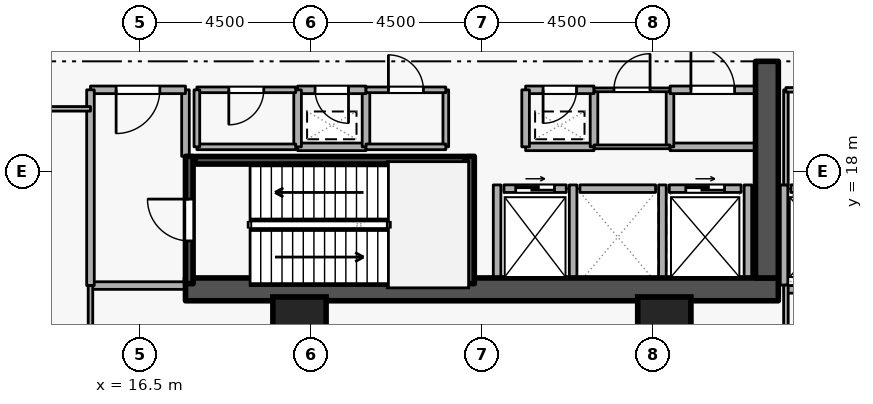
"""IFC4 building model, lengths in metres.
Left out: names, types, materials, properties, quantities, classifications, styles, units other than length and angle.
Written with IfcOpenShell. Run it as: python <this file> out.ifc"""

import sys

from ifc_helpers import new_model, si_unit, direction, frame, frame_2d, origin, origin_2d, place, context, subcontext, project, spatial, rectangle, extrude, element, fill, save


model = new_model("IFC4")
c1 = context("Model", 3, precision=1e-05, world=origin(), true_north=direction((0.0, 1.0)))
c2 = subcontext(c1, "Body", "Model", "MODEL_VIEW")
j1 = project(units=[si_unit("LENGTHUNIT", "METRE"), si_unit("PLANEANGLEUNIT", "RADIAN")], contexts=[c1])
p1 = place(None, origin())
s1 = spatial("IfcSite", under=j1, at=p1, CompositionType="ELEMENT")
p2 = place(p1, origin())
s2 = spatial("IfcBuilding", under=s1, at=p2, CompositionType="ELEMENT")
p3 = place(p2, frame((0.0, 0.0, 14.1)))
s3 = spatial("IfcBuildingStorey", under=s2, at=p3, CompositionType="ELEMENT", Elevation=14.1)
p4 = place(p3, frame((17.7, 14.9, 0.0), z_axis=(0.0, 0.0, 1.0), x_axis=(1.0, 0.0, 0.0)))
e1 = element("IfcWall", 1, at=p4, inside=s3, PredefinedType="SHEAR", context=c2, shape_type="SweptSolid", body=[
    extrude(rectangle(XDim=15.6, YDim=0.6, at=frame_2d((7.8, 0.0))), origin(), (0.0, 0.0, 1.0), 4.5),
])
p5 = place(p3, frame((33.0, 15.2, 0.0), z_axis=(0.0, 0.0, 1.0), x_axis=(0.0, 1.0, 0.0)))
e2 = element("IfcWall", 2, at=p5, inside=s3, PredefinedType="SHEAR", context=c2, shape_type="SweptSolid", body=[
    extrude(rectangle(XDim=5.7, YDim=0.6, at=frame_2d((2.85, 0.0))), origin(), (0.0, 0.0, 1.0), 4.5),
])
for number, where, z_axis, x_axis in (
    (3, (20.7, 14.0, 0.0), (0.0, 0.0, 1.0), (1.0, 0.0, 0.0)),
    (4, (30.3, 14.0, 0.0), (0.0, 0.0, 1.0), (1.0, 0.0, 0.0)),
):
    element("IfcColumn", number, at=place(p3, frame(where, z_axis=z_axis, x_axis=x_axis)), inside=s3, PredefinedType="COLUMN", context=c2, shape_type="SweptSolid", body=[
        extrude(rectangle(XDim=1.4, YDim=1.4, at=origin_2d()), origin(), (0.0, 0.0, 1.0), 4.5),
    ])
p6 = place(p3, frame((26.08, 17.55, 0.0), z_axis=(0.0, 0.0, 1.0), x_axis=(1.0, 0.0, 0.0)))
e5 = element("IfcWall", 5, at=p6, inside=s3, PredefinedType="STANDARD", context=c2, shape_type="SweptSolid", body=[
    extrude(rectangle(XDim=1.64, YDim=0.2, at=frame_2d((0.82, 0.0))), origin(), (0.0, 0.0, 1.0), 4.16),
])
p7 = place(p6, frame((0.31, 0.0, 0.0)))
e6 = element("IfcOpeningElement", 6, at=p7, cuts=e5, PredefinedType="OPENING", context=c2, shape_type="SweptSolid", body=[
    extrude(rectangle(XDim=1.02, YDim=2.06, at=frame_2d((0.51, 1.03))), frame((0.0, 0.11, 0.0), z_axis=(0.0, -1.0, 0.0), x_axis=(1.0, 0.0, 0.0)), (0.0, 0.0, 1.0), 0.22),
])
p8 = place(p3, frame((28.08, 17.55, 0.0), z_axis=(0.0, 0.0, 1.0), x_axis=(1.0, 0.0, 0.0)))
e7 = element("IfcWall", 7, at=p8, inside=s3, PredefinedType="STANDARD", context=c2, shape_type="SweptSolid", body=[
    extrude(rectangle(XDim=1.99, YDim=0.2, at=frame_2d((0.995, 0.0))), origin(), (0.0, 0.0, 1.0), 4.16),
])
p9 = place(p3, frame((30.43, 17.55, 0.0), z_axis=(0.0, 0.0, 1.0), x_axis=(1.0, 0.0, 0.0)))
e8 = element("IfcWall", 8, at=p9, inside=s3, PredefinedType="STANDARD", context=c2, shape_type="SweptSolid", body=[
    extrude(rectangle(XDim=1.89, YDim=0.2, at=frame_2d((0.945, 0.0))), origin(), (0.0, 0.0, 1.0), 4.16),
])
p10 = place(p9, frame((0.435, 0.0, 0.0)))
e9 = element("IfcOpeningElement", 9, at=p10, cuts=e8, PredefinedType="OPENING", context=c2, shape_type="SweptSolid", body=[
    extrude(rectangle(XDim=1.02, YDim=2.06, at=frame_2d((0.51, 1.03))), frame((0.0, 0.11, 0.0), z_axis=(0.0, -1.0, 0.0), x_axis=(1.0, 0.0, 0.0)), (0.0, 0.0, 1.0), 0.22),
])
p11 = place(p3, frame((33.63, 17.55, 0.0), z_axis=(0.0, 0.0, 1.0), x_axis=(1.0, 0.0, 0.0)))
e10 = element("IfcWall", 10, at=p11, inside=s3, PredefinedType="STANDARD", context=c2, shape_type="SweptSolid", body=[
    extrude(rectangle(XDim=1.74, YDim=0.2, at=frame_2d((0.87, 0.0))), origin(), (0.0, 0.0, 1.0), 4.16),
])
p12 = place(p11, frame((0.36, 0.0, 0.0)))
e11 = element("IfcOpeningElement", 11, at=p12, cuts=e10, PredefinedType="OPENING", context=c2, shape_type="SweptSolid", body=[
    extrude(rectangle(XDim=1.02, YDim=2.06, at=frame_2d((0.51, 1.03))), frame((0.0, 0.11, 0.0), z_axis=(0.0, -1.0, 0.0), x_axis=(1.0, 0.0, 0.0)), (0.0, 0.0, 1.0), 0.22),
])
for number, where, z_axis, x_axis in (
    (12, (27.9, 15.212, 0.0), (0.0, 0.0, 1.0), (0.0, 1.0, 0.0)),
    (13, (25.9, 15.212, 0.0), (0.0, 0.0, 1.0), (0.0, 1.0, 0.0)),
    (14, (30.25, 15.212, 0.0), (0.0, 0.0, 1.0), (0.0, 1.0, 0.0)),
    (15, (32.5, 15.212, 0.0), (0.0, 0.0, 1.0), (0.0, 1.0, 0.0)),
):
    element("IfcWall", number, at=place(p3, frame(where, z_axis=z_axis, x_axis=x_axis)), inside=s3, PredefinedType="STANDARD", context=c2, shape_type="SweptSolid", body=[
        extrude(rectangle(XDim=2.436, YDim=0.2, at=frame_2d((1.218, 0.0))), origin(), (0.0, 0.0, 1.0), 4.16),
    ])
p13 = place(p3, frame((33.452, 14.9, 0.0), z_axis=(0.0, 0.0, 1.0), x_axis=(1.0, 0.0, 0.0)))
e16 = element("IfcWall", 16, at=p13, inside=s3, PredefinedType="STANDARD", context=c2, shape_type="SweptSolid", body=[
    extrude(rectangle(XDim=4.196, YDim=0.2, at=frame_2d((2.098, 0.0))), origin(), (0.0, 0.0, 1.0), 4.16),
])
p14 = place(p3, frame((33.45, 15.012, 0.0), z_axis=(0.0, 0.0, 1.0), x_axis=(0.0, 1.0, 0.0)))
e17 = element("IfcWall", 17, at=p14, inside=s3, PredefinedType="STANDARD", context=c2, shape_type="SweptSolid", body=[
    extrude(rectangle(XDim=2.636, YDim=0.2, at=frame_2d((1.318, 0.0))), origin(), (0.0, 0.0, 1.0), 4.16),
])
p15 = place(p3, frame((17.8, 15.05, 0.0), z_axis=(0.0, 0.0, 1.0), x_axis=(0.0, 1.0, 0.0)))
e18 = element("IfcWall", 18, at=p15, inside=s3, PredefinedType="SHEAR", context=c2, shape_type="SweptSolid", body=[
    extrude(rectangle(XDim=3.35, YDim=0.2, at=frame_2d((1.675, 0.0))), origin(), (0.0, 0.0, 1.0), 4.5),
])
p16 = place(p15, frame((1.125, 0.0, 0.0)))
e19 = element("IfcOpeningElement", 19, at=p16, cuts=e18, PredefinedType="OPENING", context=c2, shape_type="SweptSolid", body=[
    extrude(rectangle(XDim=1.1, YDim=2.1, at=frame_2d((0.55, 1.05))), frame((0.0, 0.11, 0.0), z_axis=(0.0, -1.0, 0.0), x_axis=(1.0, 0.0, 0.0)), (0.0, 0.0, 1.0), 0.22),
])
p17 = place(p3, frame((25.2, 18.4, 0.0), z_axis=(0.0, 0.0, 1.0), x_axis=(0.0, -1.0, 0.0)))
e20 = element("IfcWall", 20, at=p17, inside=s3, PredefinedType="SHEAR", context=c2, shape_type="SweptSolid", body=[
    extrude(rectangle(XDim=3.35, YDim=0.2, at=frame_2d((1.675, 0.0))), origin(), (0.0, 0.0, 1.0), 4.5),
])
p18 = place(p3, frame((25.05, 18.297, 0.0), z_axis=(0.0, 0.0, 1.0), x_axis=(-1.0, 0.0, 0.0)))
e21 = element("IfcWall", 21, at=p18, inside=s3, PredefinedType="SHEAR", context=c2, shape_type="SweptSolid", body=[
    extrude(rectangle(XDim=7.1, YDim=0.2, at=frame_2d((3.55, 0.0))), origin(), (0.0, 0.0, 1.0), 4.5),
])
p19 = place(p3, frame((15.2, 15.0, 0.0), z_axis=(0.0, 0.0, 1.0), x_axis=(1.0, 0.0, 0.0)))
e22 = element("IfcWall", 22, at=p19, inside=s3, PredefinedType="STANDARD", context=c2, shape_type="SweptSolid", body=[
    extrude(rectangle(XDim=2.5, YDim=0.2, at=frame_2d((1.25, 0.0))), origin(), (0.0, 0.0, 1.0), 4.16),
])
p20 = place(p3, frame((17.7, 18.4, 0.0), z_axis=(0.0, 0.0, 1.0), x_axis=(0.0, 1.0, 0.0)))
e23 = element("IfcWall", 23, at=p20, inside=s3, PredefinedType="STANDARD", context=c2, shape_type="SweptSolid", body=[
    extrude(rectangle(XDim=1.75, YDim=0.2, at=frame_2d((0.875, 0.0))), origin(), (0.0, 0.0, 1.0), 3.365),
])
p21 = place(p3, frame((17.7, 20.15, 0.0), z_axis=(0.0, 0.0, 1.0), x_axis=(-1.0, 0.0, 0.0)))
e24 = element("IfcWall", 24, at=p21, inside=s3, PredefinedType="STANDARD", context=c2, shape_type="SweptSolid", body=[
    extrude(rectangle(XDim=2.5, YDim=0.2, at=frame_2d((1.25, 0.0))), origin(), (0.0, 0.0, 1.0), 4.16),
])
p22 = place(p21, frame((0.675, 0.0, 0.0)))
e25 = element("IfcOpeningElement", 25, at=p22, cuts=e24, PredefinedType="OPENING", context=c2, shape_type="SweptSolid", body=[
    extrude(rectangle(XDim=1.15, YDim=2.1, at=frame_2d((0.575, 1.05))), frame((0.0, 0.11, 0.0), z_axis=(0.0, -1.0, 0.0), x_axis=(1.0, 0.0, 0.0)), (0.0, 0.0, 1.0), 0.22),
])
p23 = place(p3, frame((15.2, 20.15, 0.0), z_axis=(0.0, 0.0, 1.0), x_axis=(0.0, -1.0, 0.0)))
e26 = element("IfcWall", 26, at=p23, inside=s3, PredefinedType="STANDARD", context=c2, shape_type="SweptSolid", body=[
    extrude(rectangle(XDim=5.15, YDim=0.2, at=frame_2d((2.575, 0.0))), origin(), (0.0, 0.0, 1.0), 4.16),
])
p24 = place(p3, frame((26.65, 18.65, 0.0), z_axis=(0.0, 0.0, 1.0), x_axis=(1.0, 0.0, 0.0)))
e27 = element("IfcWall", 27, at=p24, inside=s3, PredefinedType="STANDARD", context=c2, shape_type="SweptSolid", body=[
    extrude(rectangle(XDim=1.8, YDim=0.2, at=frame_2d((0.9, 0.0))), origin(), (0.0, 0.0, 1.0), 4.16),
])
p25 = place(p3, frame((28.45, 18.65, 0.0), z_axis=(0.0, 0.0, 1.0), x_axis=(0.0, 1.0, 0.0)))
e28 = element("IfcWall", 28, at=p25, inside=s3, PredefinedType="STANDARD", context=c2, shape_type="SweptSolid", body=[
    extrude(rectangle(XDim=1.5, YDim=0.2, at=frame_2d((0.75, 0.0))), origin(), (0.0, 0.0, 1.0), 4.16),
])
p26 = place(p3, frame((28.45, 20.15, 0.0), z_axis=(0.0, 0.0, 1.0), x_axis=(-1.0, 0.0, 0.0)))
e29 = element("IfcWall", 29, at=p26, inside=s3, PredefinedType="STANDARD", context=c2, shape_type="SweptSolid", body=[
    extrude(rectangle(XDim=1.8, YDim=0.2, at=frame_2d((0.9, 0.0))), origin(), (0.0, 0.0, 1.0), 4.16),
])
p27 = place(p26, frame((0.46, 0.0, 0.0)))
e30 = element("IfcOpeningElement", 30, at=p27, cuts=e29, PredefinedType="OPENING", context=c2, shape_type="SweptSolid", body=[
    extrude(rectangle(XDim=0.88, YDim=2.04, at=frame_2d((0.44, 1.02))), frame((0.0, 0.11, 0.0), z_axis=(0.0, -1.0, 0.0), x_axis=(1.0, 0.0, 0.0)), (0.0, 0.0, 1.0), 0.22),
])
p28 = place(p3, frame((26.65, 20.15, 0.0), z_axis=(0.0, 0.0, 1.0), x_axis=(0.0, -1.0, 0.0)))
e31 = element("IfcWall", 31, at=p28, inside=s3, PredefinedType="STANDARD", context=c2, shape_type="SweptSolid", body=[
    extrude(rectangle(XDim=1.5, YDim=0.2, at=frame_2d((0.75, 0.0))), origin(), (0.0, 0.0, 1.0), 4.16),
])
p29 = place(p3, frame((20.65, 18.65, 0.0), z_axis=(0.0, 0.0, 1.0), x_axis=(1.0, 0.0, 0.0)))
e32 = element("IfcWall", 32, at=p29, inside=s3, PredefinedType="STANDARD", context=c2, shape_type="SweptSolid", body=[
    extrude(rectangle(XDim=1.8, YDim=0.2, at=frame_2d((0.9, 0.0))), origin(), (0.0, 0.0, 1.0), 4.16),
])
p30 = place(p3, frame((22.45, 18.65, 0.0), z_axis=(0.0, 0.0, 1.0), x_axis=(0.0, 1.0, 0.0)))
e33 = element("IfcWall", 33, at=p30, inside=s3, PredefinedType="STANDARD", context=c2, shape_type="SweptSolid", body=[
    extrude(rectangle(XDim=1.5, YDim=0.2, at=frame_2d((0.75, 0.0))), origin(), (0.0, 0.0, 1.0), 4.16),
])
p31 = place(p3, frame((22.45, 20.15, 0.0), z_axis=(0.0, 0.0, 1.0), x_axis=(-1.0, 0.0, 0.0)))
e34 = element("IfcWall", 34, at=p31, inside=s3, PredefinedType="STANDARD", context=c2, shape_type="SweptSolid", body=[
    extrude(rectangle(XDim=1.8, YDim=0.2, at=frame_2d((0.9, 0.0))), origin(), (0.0, 0.0, 1.0), 4.16),
])
p32 = place(p31, frame((0.46, 0.0, 0.0)))
e35 = element("IfcOpeningElement", 35, at=p32, cuts=e34, PredefinedType="OPENING", context=c2, shape_type="SweptSolid", body=[
    extrude(rectangle(XDim=0.88, YDim=2.04, at=frame_2d((0.44, 1.02))), frame((0.0, 0.11, 0.0), z_axis=(0.0, -1.0, 0.0), x_axis=(1.0, 0.0, 0.0)), (0.0, 0.0, 1.0), 0.22),
])
p33 = place(p3, frame((20.65, 20.15, 0.0), z_axis=(0.0, 0.0, 1.0), x_axis=(0.0, -1.0, 0.0)))
e36 = element("IfcWall", 36, at=p33, inside=s3, PredefinedType="STANDARD", context=c2, shape_type="SweptSolid", body=[
    extrude(rectangle(XDim=1.5, YDim=0.2, at=frame_2d((0.75, 0.0))), origin(), (0.0, 0.0, 1.0), 4.16),
])
p34 = place(p3, frame((32.7, 18.65, 0.0), z_axis=(0.0, 0.0, 1.0), x_axis=(-1.0, 0.0, 0.0)))
e37 = element("IfcWall", 37, at=p34, inside=s3, PredefinedType="STANDARD", context=c2, shape_type="SweptSolid", body=[
    extrude(rectangle(XDim=2.25, YDim=0.2, at=frame_2d((1.125, 0.0))), origin(), (0.0, 0.0, 1.0), 4.16),
])
p35 = place(p3, frame((30.45, 18.65, 0.0), z_axis=(0.0, 0.0, 1.0), x_axis=(0.0, 1.0, 0.0)))
e38 = element("IfcWall", 38, at=p35, inside=s3, PredefinedType="STANDARD", context=c2, shape_type="SweptSolid", body=[
    extrude(rectangle(XDim=1.5, YDim=0.2, at=frame_2d((0.75, 0.0))), origin(), (0.0, 0.0, 1.0), 4.16),
])
p36 = place(p3, frame((30.45, 20.15, 0.0), z_axis=(0.0, 0.0, 1.0), x_axis=(1.0, 0.0, 0.0)))
e39 = element("IfcWall", 39, at=p36, inside=s3, PredefinedType="STANDARD", context=c2, shape_type="SweptSolid", body=[
    extrude(rectangle(XDim=2.25, YDim=0.2, at=frame_2d((1.125, 0.0))), origin(), (0.0, 0.0, 1.0), 4.16),
])
p37 = place(p36, frame((0.55, 0.0, 0.0)))
e40 = element("IfcOpeningElement", 40, at=p37, cuts=e39, PredefinedType="OPENING", context=c2, shape_type="SweptSolid", body=[
    extrude(rectangle(XDim=1.15, YDim=2.1, at=frame_2d((0.575, 1.05))), frame((0.0, 0.11, 0.0), z_axis=(0.0, -1.0, 0.0), x_axis=(1.0, 0.0, 0.0)), (0.0, 0.0, 1.0), 0.22),
])
p38 = place(p3, frame((18.0, 18.65, 0.0), z_axis=(0.0, 0.0, 1.0), x_axis=(1.0, 0.0, 0.0)))
e41 = element("IfcWall", 41, at=p38, inside=s3, PredefinedType="PARTITIONING", context=c2, shape_type="SweptSolid", body=[
    extrude(rectangle(XDim=2.6, YDim=0.15, at=frame_2d((1.3, 0.0))), origin(), (0.0, 0.0, 1.0), 4.16),
])
p39 = place(p3, frame((20.6, 20.15, 0.0), z_axis=(0.0, 0.0, 1.0), x_axis=(-1.0, 0.0, 0.0)))
e42 = element("IfcWall", 42, at=p39, inside=s3, PredefinedType="PARTITIONING", context=c2, shape_type="SweptSolid", body=[
    extrude(rectangle(XDim=2.6, YDim=0.15, at=frame_2d((1.3, 0.0))), origin(), (0.0, 0.0, 1.0), 4.16),
])
p40 = place(p39, frame((0.84, 0.0, 0.0)))
e43 = element("IfcOpeningElement", 43, at=p40, cuts=e42, PredefinedType="OPENING", context=c2, shape_type="SweptSolid", body=[
    extrude(rectangle(XDim=0.92, YDim=2.08, at=frame_2d((0.46, 1.04))), frame((0.0, 0.085, 0.0), z_axis=(0.0, -1.0, 0.0), x_axis=(1.0, 0.0, 0.0)), (0.0, 0.0, 1.0), 0.17),
])
p41 = place(p3, frame((18.0, 20.15, 0.0), z_axis=(0.0, 0.0, 1.0), x_axis=(0.0, -1.0, 0.0)))
e44 = element("IfcWall", 44, at=p41, inside=s3, PredefinedType="PARTITIONING", context=c2, shape_type="SweptSolid", body=[
    extrude(rectangle(XDim=1.5, YDim=0.15, at=frame_2d((0.75, 0.0))), origin(), (0.0, 0.0, 1.0), 3.365),
])
p42 = place(p3, frame((24.55, 20.15, 0.0), z_axis=(0.0, 0.0, 1.0), x_axis=(0.0, -1.0, 0.0)))
e45 = element("IfcWall", 45, at=p42, inside=s3, PredefinedType="PARTITIONING", context=c2, shape_type="SweptSolid", body=[
    extrude(rectangle(XDim=1.5, YDim=0.15, at=frame_2d((0.75, 0.0))), origin(), (0.0, 0.0, 1.0), 4.16),
])
p43 = place(p3, frame((24.55, 18.65, 0.0), z_axis=(0.0, 0.0, 1.0), x_axis=(-1.0, 0.0, 0.0)))
e46 = element("IfcWall", 46, at=p43, inside=s3, PredefinedType="PARTITIONING", context=c2, shape_type="SweptSolid", body=[
    extrude(rectangle(XDim=2.1, YDim=0.15, at=frame_2d((1.05, 0.0))), origin(), (0.0, 0.0, 1.0), 4.16),
])
p44 = place(p3, frame((22.45, 20.15, 0.0), z_axis=(0.0, 0.0, 1.0), x_axis=(1.0, 0.0, 0.0)))
e47 = element("IfcWall", 47, at=p44, inside=s3, PredefinedType="PARTITIONING", context=c2, shape_type="SweptSolid", body=[
    extrude(rectangle(XDim=2.1, YDim=0.15, at=frame_2d((1.05, 0.0))), origin(), (0.0, 0.0, 1.0), 4.16),
])
p45 = place(p44, frame((0.59, 0.0, 0.0)))
e48 = element("IfcOpeningElement", 48, at=p45, cuts=e47, PredefinedType="OPENING", context=c2, shape_type="SweptSolid", body=[
    extrude(rectangle(XDim=0.92, YDim=2.08, at=frame_2d((0.46, 1.04))), frame((0.0, 0.085, 0.0), z_axis=(0.0, -1.0, 0.0), x_axis=(1.0, 0.0, 0.0)), (0.0, 0.0, 1.0), 0.17),
])
p46 = place(p3, frame((30.45, 18.65, 0.0), z_axis=(0.0, 0.0, 1.0), x_axis=(-1.0, 0.0, 0.0)))
e49 = element("IfcWall", 49, at=p46, inside=s3, PredefinedType="PARTITIONING", context=c2, shape_type="SweptSolid", body=[
    extrude(rectangle(XDim=2.0, YDim=0.1, at=frame_2d((1.0, 0.0))), origin(), (0.0, 0.0, 1.0), 4.16),
])
p47 = place(p3, frame((28.45, 20.15, 0.0), z_axis=(0.0, 0.0, 1.0), x_axis=(1.0, 0.0, 0.0)))
e50 = element("IfcWall", 50, at=p47, inside=s3, PredefinedType="PARTITIONING", context=c2, shape_type="SweptSolid", body=[
    extrude(rectangle(XDim=2.0, YDim=0.1, at=frame_2d((1.0, 0.0))), origin(), (0.0, 0.0, 1.0), 4.16),
])
p48 = place(p47, frame((0.525, 0.0, 0.0)))
e51 = element("IfcOpeningElement", 51, at=p48, cuts=e50, PredefinedType="OPENING", context=c2, shape_type="SweptSolid", body=[
    extrude(rectangle(XDim=0.95, YDim=2.1, at=frame_2d((0.475, 1.05))), frame((0.0, 0.06, 0.0), z_axis=(0.0, -1.0, 0.0), x_axis=(1.0, 0.0, 0.0)), (0.0, 0.0, 1.0), 0.12),
])
p49 = place(p3, frame((9.2, 19.65, 0.0), z_axis=(0.0, 0.0, 1.0), x_axis=(1.0, 0.0, 0.0)))
e52 = element("IfcWall", 52, at=p49, inside=s3, PredefinedType="PARTITIONING", context=c2, shape_type="SweptSolid", body=[
    extrude(rectangle(XDim=6.0, YDim=0.12, at=frame_2d((3.0, 0.0))), origin(), (0.0, 0.0, 1.0), 4.16),
])
p50 = place(p49, frame((2.475, 0.0, 0.0)))
e53 = element("IfcOpeningElement", 53, at=p50, cuts=e52, PredefinedType="OPENING", context=c2, shape_type="SweptSolid", body=[
    extrude(rectangle(XDim=1.05, YDim=2.1, at=frame_2d((0.525, 1.05))), frame((0.0, 0.07, 0.0), z_axis=(0.0, -1.0, 0.0), x_axis=(1.0, 0.0, 0.0)), (0.0, 0.0, 1.0), 0.14),
])
p51 = place(p3, frame((15.2, 15.0, 0.0), z_axis=(0.0, 0.0, 1.0), x_axis=(0.0, -1.0, 0.0)))
e54 = element("IfcWall", 54, at=p51, inside=s3, PredefinedType="PARTITIONING", context=c2, shape_type="SweptSolid", body=[
    extrude(rectangle(XDim=5.68, YDim=0.12, at=frame_2d((2.84, 0.0))), origin(), (0.0, 0.0, 1.0), 4.16),
])
p52 = place(p3, frame((33.5, 9.32, 0.0), z_axis=(0.0, 0.0, 1.0), x_axis=(0.0, 1.0, 0.0)))
e55 = element("IfcWall", 55, at=p52, inside=s3, PredefinedType="PARTITIONING", context=c2, shape_type="SweptSolid", body=[
    extrude(rectangle(XDim=5.692, YDim=0.12, at=frame_2d((2.846, 0.0))), origin(), (0.0, 0.0, 1.0), 4.16),
])
p53 = place(p3, frame((33.5, 17.648, 0.0), z_axis=(0.0, 0.0, 1.0), x_axis=(0.0, 1.0, 0.0)))
e56 = element("IfcWall", 56, at=p53, inside=s3, PredefinedType="PARTITIONING", context=c2, shape_type="SweptSolid", body=[
    extrude(rectangle(XDim=2.502, YDim=0.12, at=frame_2d((1.251, 0.0))), origin(), (0.0, 0.0, 1.0), 4.16),
])
p54 = place(p3, frame((33.5, 20.15, 0.0), z_axis=(0.0, 0.0, 1.0), x_axis=(1.0, 0.0, 0.0)))
e57 = element("IfcWall", 57, at=p54, inside=s3, PredefinedType="PARTITIONING", context=c2, shape_type="SweptSolid", body=[
    extrude(rectangle(XDim=17.1, YDim=0.12, at=frame_2d((8.55, 0.0))), origin(), (0.0, 0.0, 1.0), 4.16),
])
p55 = place(p54, frame((8.025, 0.0, 0.0)))
e58 = element("IfcOpeningElement", 58, at=p55, cuts=e57, PredefinedType="OPENING", context=c2, shape_type="SweptSolid", body=[
    extrude(rectangle(XDim=1.05, YDim=2.1, at=frame_2d((0.525, 1.05))), frame((0.0, 0.07, 0.0), z_axis=(0.0, -1.0, 0.0), x_axis=(1.0, 0.0, 0.0)), (0.0, 0.0, 1.0), 0.14),
])
p56 = place(p7, origin())
e59 = element("IfcDoor", 59, at=p56, inside=s3, OperationType="SLIDING_TO_LEFT", PredefinedType="DOOR", context=c2, shape_type="SweptSolid", body=[
    extrude(rectangle(XDim=1.02, YDim=2.06, at=frame_2d((0.51, 1.03))), frame((0.0, 0.025, 0.0), z_axis=(0.0, -1.0, 0.0), x_axis=(1.0, 0.0, 0.0)), (0.0, 0.0, 1.0), 0.05),
])
fill(e6, e59)
p57 = place(p10, origin())
e60 = element("IfcDoor", 60, at=p57, inside=s3, OperationType="SLIDING_TO_LEFT", PredefinedType="DOOR", context=c2, shape_type="SweptSolid", body=[
    extrude(rectangle(XDim=1.02, YDim=2.06, at=frame_2d((0.51, 1.03))), frame((0.0, 0.025, 0.0), z_axis=(0.0, -1.0, 0.0), x_axis=(1.0, 0.0, 0.0)), (0.0, 0.0, 1.0), 0.05),
])
fill(e9, e60)
p58 = place(p16, origin())
e61 = element("IfcDoor", 61, at=p58, inside=s3, OperationType="SINGLE_SWING_RIGHT", PredefinedType="DOOR", context=c2, shape_type="SweptSolid", body=[
    extrude(rectangle(XDim=1.1, YDim=2.1, at=frame_2d((0.55, 1.05))), frame((0.0, 0.025, 0.0), z_axis=(0.0, -1.0, 0.0), x_axis=(1.0, 0.0, 0.0)), (0.0, 0.0, 1.0), 0.05),
])
fill(e19, e61)
p59 = place(p22, origin())
e62 = element("IfcDoor", 62, at=p59, inside=s3, OperationType="SINGLE_SWING_RIGHT", PredefinedType="DOOR", context=c2, shape_type="SweptSolid", body=[
    extrude(rectangle(XDim=1.15, YDim=2.1, at=frame_2d((0.575, 1.05))), frame((0.0, 0.025, 0.0), z_axis=(0.0, -1.0, 0.0), x_axis=(1.0, 0.0, 0.0)), (0.0, 0.0, 1.0), 0.05),
])
fill(e25, e62)
p60 = place(p27, origin())
e63 = element("IfcDoor", 63, at=p60, inside=s3, OperationType="SINGLE_SWING_RIGHT", PredefinedType="DOOR", context=c2, shape_type="SweptSolid", body=[
    extrude(rectangle(XDim=0.88, YDim=2.04, at=frame_2d((0.44, 1.02))), frame((0.0, 0.025, 0.0), z_axis=(0.0, -1.0, 0.0), x_axis=(1.0, 0.0, 0.0)), (0.0, 0.0, 1.0), 0.05),
])
fill(e30, e63)
p61 = place(p32, origin())
e64 = element("IfcDoor", 64, at=p61, inside=s3, OperationType="SINGLE_SWING_LEFT", PredefinedType="DOOR", context=c2, shape_type="SweptSolid", body=[
    extrude(rectangle(XDim=0.88, YDim=2.04, at=frame_2d((0.44, 1.02))), frame((0.0, 0.025, 0.0), z_axis=(0.0, -1.0, 0.0), x_axis=(1.0, 0.0, 0.0)), (0.0, 0.0, 1.0), 0.05),
])
fill(e35, e64)
p62 = place(p40, origin())
e65 = element("IfcDoor", 65, at=p62, inside=s3, OperationType="SINGLE_SWING_RIGHT", PredefinedType="DOOR", context=c2, shape_type="SweptSolid", body=[
    extrude(rectangle(XDim=0.92, YDim=2.08, at=frame_2d((0.46, 1.04))), frame((0.0, 0.025, 0.0), z_axis=(0.0, -1.0, 0.0), x_axis=(1.0, 0.0, 0.0)), (0.0, 0.0, 1.0), 0.05),
])
fill(e43, e65)
p63 = place(p45, origin())
e66 = element("IfcDoor", 66, at=p63, inside=s3, OperationType="SINGLE_SWING_LEFT", PredefinedType="DOOR", context=c2, shape_type="SweptSolid", body=[
    extrude(rectangle(XDim=0.92, YDim=2.08, at=frame_2d((0.46, 1.04))), frame((0.0, 0.025, 0.0), z_axis=(0.0, -1.0, 0.0), x_axis=(1.0, 0.0, 0.0)), (0.0, 0.0, 1.0), 0.05),
])
fill(e48, e66)
p64 = place(p48, origin())
e67 = element("IfcDoor", 67, at=p64, inside=s3, OperationType="SINGLE_SWING_RIGHT", PredefinedType="DOOR", context=c2, shape_type="SweptSolid", body=[
    extrude(rectangle(XDim=0.95, YDim=2.1, at=frame_2d((0.475, 1.05))), frame((0.0, 0.025, 0.0), z_axis=(0.0, -1.0, 0.0), x_axis=(1.0, 0.0, 0.0)), (0.0, 0.0, 1.0), 0.05),
])
fill(e51, e67)
p65 = place(p37, origin())
e68 = element("IfcDoor", 68, at=p65, inside=s3, OperationType="SINGLE_SWING_LEFT", PredefinedType="DOOR", context=c2, shape_type="SweptSolid", body=[
    extrude(rectangle(XDim=1.15, YDim=2.1, at=frame_2d((0.575, 1.05))), frame((0.0, 0.025, 0.0), z_axis=(0.0, -1.0, 0.0), x_axis=(1.0, 0.0, 0.0)), (0.0, 0.0, 1.0), 0.05),
])
fill(e40, e68)
save(model, sys.argv[1])
